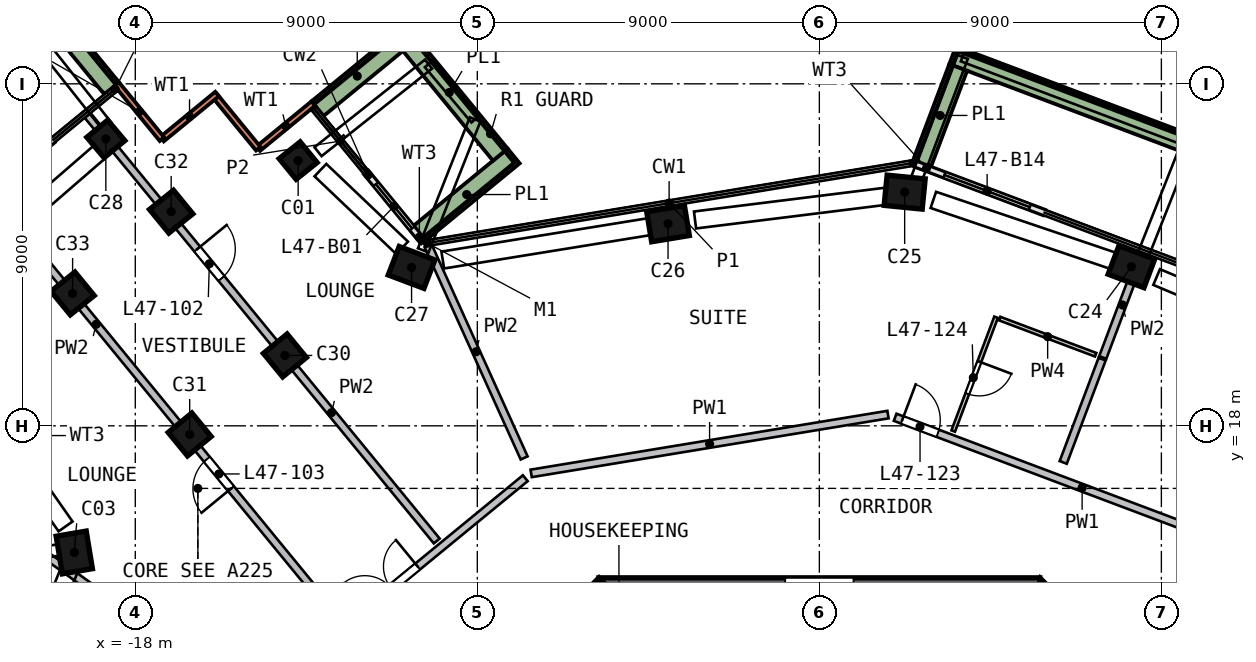
"""IFC4 building model, lengths in metres.
Left out: names, types, materials, properties, quantities, classifications, styles, units other than length and angle.
Written with IfcOpenShell. Run it as: python <this file> out.ifc"""

import sys

from ifc_helpers import new_model, si_unit, direction, frame, frame_2d, origin, origin_2d, place, context, subcontext, project, spatial, rectangle, extrude, element, fill, save


model = new_model("IFC4")
c1 = context("Model", 3, precision=1e-05, world=origin(), true_north=direction((0.0, 1.0)))
c2 = subcontext(c1, "Body", "Model", "MODEL_VIEW")
j1 = project(units=[si_unit("LENGTHUNIT", "METRE"), si_unit("PLANEANGLEUNIT", "RADIAN")], contexts=[c1])
p1 = place(None, origin())
s1 = spatial("IfcSite", under=j1, at=p1, CompositionType="ELEMENT")
p2 = place(p1, origin())
s2 = spatial("IfcBuilding", under=s1, at=p2, CompositionType="ELEMENT")
p3 = place(p2, frame((0.0, 0.0, 194.0)))
s3 = spatial("IfcBuildingStorey", under=s2, at=p3, CompositionType="ELEMENT", Elevation=194.0)
p4 = place(p3, frame((-13.515, 24.992, 0.0), z_axis=(-0.163974568, -0.009965305, 0.98641423), x_axis=(-0.62120179, 0.777821307, -0.095406236)))
e1 = element("IfcColumn", 1, at=p4, inside=s3, PredefinedType="COLUMN", context=c2, shape_type="SweptSolid", body=[
    extrude(rectangle(XDim=0.7, YDim=0.7, at=origin_2d()), origin(), (0.0, 0.0, 1.0), 3.234),
])
p5 = place(p3, frame((-19.521, 14.78, 0.0), z_axis=(-0.069476843, -0.093421269, 0.993199595), x_axis=(-0.169022074, 0.982313293, 0.080573769)))
e2 = element("IfcColumn", 2, at=p5, inside=s3, PredefinedType="COLUMN", context=c2, shape_type="SweptSolid", body=[
    extrude(rectangle(XDim=1.0, YDim=0.8, at=origin_2d()), origin(), (0.0, 0.0, 1.0), 3.212),
])
p6 = place(p3, frame((8.339, 22.14, 0.0), z_axis=(-0.105631262, 0.038784697, 0.993648722), x_axis=(-0.929821941, 0.350385276, -0.112522514)))
e3 = element("IfcColumn", 3, at=p6, inside=s3, PredefinedType="COLUMN", context=c2, shape_type="SweptSolid", body=[
    extrude(rectangle(XDim=1.0, YDim=0.8, at=origin_2d()), origin(), (0.0, 0.0, 1.0), 3.21),
])
p7 = place(p3, frame((2.384, 24.137, 0.0), z_axis=(-0.114871908, 0.010339232, 0.993326505), x_axis=(0.988536042, -0.097442208, 0.115332167)))
e4 = element("IfcColumn", 4, at=p7, inside=s3, PredefinedType="COLUMN", context=c2, shape_type="SweptSolid", body=[
    extrude(rectangle(XDim=1.0, YDim=0.8, at=origin_2d()), origin(), (0.0, 0.0, 1.0), 3.211),
])
p8 = place(p3, frame((-3.848, 23.343, 0.0), z_axis=(-0.110878491, -0.019240232, 0.993647711), x_axis=(-0.980424155, -0.161570885, -0.112531444)))
e5 = element("IfcColumn", 5, at=p8, inside=s3, PredefinedType="COLUMN", context=c2, shape_type="SweptSolid", body=[
    extrude(rectangle(XDim=1.0, YDim=0.8, at=origin_2d()), origin(), (0.0, 0.0, 1.0), 3.21),
])
p9 = place(p3, frame((-10.603, 22.23, 0.0), z_axis=(-0.105270942, -0.051305333, 0.993119223), x_axis=(0.930381174, -0.35772673, 0.080140241)))
e6 = element("IfcColumn", 6, at=p9, inside=s3, PredefinedType="COLUMN", context=c2, shape_type="SweptSolid", body=[
    extrude(rectangle(XDim=1.0, YDim=0.8, at=origin_2d()), origin(), (0.0, 0.0, 1.0), 3.212),
])
p10 = place(p3, frame((-18.572, 25.591, 0.0), z_axis=(-0.166383559, -0.033865013, 0.985479412), x_axis=(-0.756669368, -0.636446663, -0.149623234)))
e7 = element("IfcColumn", 7, at=p10, inside=s3, PredefinedType="COLUMN", context=c2, shape_type="SweptSolid", body=[
    extrude(rectangle(XDim=0.7, YDim=0.7, at=origin_2d()), origin(), (0.0, 0.0, 1.0), 3.237),
])
for number, where, z_axis, x_axis in (
    (8, (-13.949, 19.933, 0.0), (-0.094, -0.067, 0.993), (-0.634, 0.774, -0.008)),
    (9, (-16.467, 17.868, 0.0), (-0.084, -0.079, 0.993), (-0.635, 0.773, 0.008)),
):
    element("IfcColumn", number, at=place(p3, frame(where, z_axis=z_axis, x_axis=x_axis)), inside=s3, PredefinedType="COLUMN", context=c2, shape_type="SweptSolid", body=[
        extrude(rectangle(XDim=0.8, YDim=0.8, at=origin_2d()), origin(), (0.0, 0.0, 1.0), 3.211),
    ])
p11 = place(p3, frame((-16.864, 23.667, 0.0), z_axis=(-0.157749477, -0.025762726, 0.987143041), x_axis=(-0.623531863, 0.777761167, -0.079344709)))
e10 = element("IfcColumn", 10, at=p11, inside=s3, PredefinedType="COLUMN", context=c2, shape_type="SweptSolid", body=[
    extrude(rectangle(XDim=0.8, YDim=0.8, at=origin_2d()), origin(), (0.0, 0.0, 1.0), 3.231),
])
p12 = place(p3, frame((-19.47, 21.53, 0.0), z_axis=(-0.147722608, -0.038046325, 0.988296771), x_axis=(-0.625986213, 0.777232529, -0.063646343)))
e11 = element("IfcColumn", 11, at=p12, inside=s3, PredefinedType="COLUMN", context=c2, shape_type="SweptSolid", body=[
    extrude(rectangle(XDim=0.8, YDim=0.8, at=origin_2d()), origin(), (0.0, 0.0, 1.0), 3.228),
])
p13 = place(p3, frame((13.788, 5.587, 0.0), z_axis=(0.0, 0.0, 1.0), x_axis=(-0.707106781, 0.707106781, 0.0)))
e12 = element("IfcWall", 12, at=p13, inside=s3, PredefinedType="SHEAR", context=c2, shape_type="SweptSolid", body=[
    extrude(rectangle(XDim=11.598, YDim=0.6, at=frame_2d((5.799, 0.0))), origin(), (0.0, 0.0, 1.0), 3.5),
])
p14 = place(p13, frame((2.099, 0.0, 0.0)))
e13 = element("IfcOpeningElement", 13, at=p14, cuts=e12, PredefinedType="OPENING", context=c2, shape_type="SweptSolid", body=[
    extrude(rectangle(XDim=1.2, YDim=2.1, at=frame_2d((0.6, 1.05))), frame((0.0, 0.31, 0.0), z_axis=(0.0, -1.0, 0.0), x_axis=(1.0, 0.0, 0.0)), (0.0, 0.0, 1.0), 0.62),
])
p15 = place(p3, frame((5.799, 13.7, 0.0), z_axis=(0.0, 0.0, 1.0), x_axis=(-1.0, 0.0, 0.0)))
e14 = element("IfcWall", 14, at=p15, inside=s3, PredefinedType="SHEAR", context=c2, shape_type="SweptSolid", body=[
    extrude(rectangle(XDim=11.598, YDim=0.6, at=frame_2d((5.799, 0.0))), origin(), (0.0, 0.0, 1.0), 3.5),
])
p16 = place(p15, frame((4.899, 0.0, 0.0)))
e15 = element("IfcOpeningElement", 15, at=p16, cuts=e14, PredefinedType="OPENING", context=c2, shape_type="SweptSolid", body=[
    extrude(rectangle(XDim=1.8, YDim=2.1, at=frame_2d((0.9, 1.05))), frame((0.0, 0.31, 0.0), z_axis=(0.0, -1.0, 0.0), x_axis=(1.0, 0.0, 0.0)), (0.0, 0.0, 1.0), 0.62),
])
p17 = place(p3, frame((-5.587, 13.788, 0.0), z_axis=(0.0, 0.0, 1.0), x_axis=(-0.707106781, -0.707106781, 0.0)))
e16 = element("IfcWall", 16, at=p17, inside=s3, PredefinedType="SHEAR", context=c2, shape_type="SweptSolid", body=[
    extrude(rectangle(XDim=11.598, YDim=0.6, at=frame_2d((5.799, 0.0))), origin(), (0.0, 0.0, 1.0), 3.5),
])
p18 = place(p3, frame((-13.315, 26.482, 0.0), z_axis=(0.0, 0.0, 1.0), x_axis=(-0.77315031, -0.63422283, 0.0)))
e17 = element("IfcWall", 17, at=p18, inside=s3, PredefinedType="SOLIDWALL", context=c2, shape_type="SweptSolid", body=[
    extrude(rectangle(XDim=1.875, YDim=0.15, at=frame_2d((0.938, 0.0))), origin(), (0.0, 0.0, 1.0), 3.19),
])
p19 = place(p3, frame((-14.764, 25.293, 0.0), z_axis=(0.0, 0.0, 1.0), x_axis=(-0.634175276, 0.773189317, 0.0)))
e18 = element("IfcWall", 18, at=p19, inside=s3, PredefinedType="SOLIDWALL", context=c2, shape_type="SweptSolid", body=[
    extrude(rectangle(XDim=1.8, YDim=0.15, at=frame_2d((0.9, 0.0))), origin(), (0.0, 0.0, 1.0), 3.19),
])
for number, where, z_axis, x_axis in (
    (19, (-15.848, 26.732, 0.0), (0.0, 0.0, 1.0), (-0.773, -0.634, 0.0)),
    (20, (-17.298, 25.543, 0.0), (0.0, 0.0, 1.0), (-0.634, 0.773, 0.0)),
):
    element("IfcWall", number, at=place(p3, frame(where, z_axis=z_axis, x_axis=x_axis)), inside=s3, PredefinedType="SOLIDWALL", context=c2, shape_type="SweptSolid", body=[
        extrude(rectangle(XDim=1.875, YDim=0.15, at=frame_2d((0.938, 0.0))), origin(), (0.0, 0.0, 1.0), 3.19),
    ])
p20 = place(p3, frame((-10.461, 22.885, 0.0), z_axis=(0.0, 0.0, 1.0), x_axis=(-0.634212662, 0.773158651, 0.0)))
e21 = element("IfcWall", 21, at=p20, inside=s3, PredefinedType="SOLIDWALL", context=c2, shape_type="SweptSolid", body=[
    extrude(rectangle(XDim=2.303, YDim=0.15, at=frame_2d((1.152, 0.0))), origin(), (0.0, 0.0, 1.0), 2.475),
])
p21 = place(p20, frame((0.404, 0.0, 0.0)))
e22 = element("IfcOpeningElement", 22, at=p21, cuts=e21, PredefinedType="OPENING", context=c2, shape_type="SweptSolid", body=[
    extrude(rectangle(XDim=1.5, YDim=2.4, at=frame_2d((0.75, 1.2))), frame((0.0, 0.085, 0.0), z_axis=(0.0, -1.0, 0.0), x_axis=(1.0, 0.0, 0.0)), (0.0, 0.0, 1.0), 0.17),
])
p22 = place(p3, frame((-20.167, 25.517, 0.0), z_axis=(0.0, 0.0, 1.0), x_axis=(-0.77314587, -0.634228242, 0.0)))
e23 = element("IfcWall", 23, at=p22, inside=s3, PredefinedType="SOLIDWALL", context=c2, shape_type="SweptSolid", body=[
    extrude(rectangle(XDim=3.26, YDim=0.15, at=frame_2d((1.63, 0.0))), origin(), (0.0, 0.0, 1.0), 2.475),
])
p23 = place(p22, frame((0.4, 0.0, 0.0)))
e24 = element("IfcOpeningElement", 24, at=p23, cuts=e23, PredefinedType="OPENING", context=c2, shape_type="SweptSolid", body=[
    extrude(rectangle(XDim=1.5, YDim=2.4, at=frame_2d((0.75, 1.2))), frame((0.0, 0.085, 0.0), z_axis=(0.0, -1.0, 0.0), x_axis=(1.0, 0.0, 0.0)), (0.0, 0.0, 1.0), 0.17),
])
p24 = place(p3, frame((5.913, 23.615, 0.0), z_axis=(0.0, 0.0, 1.0), x_axis=(-0.935824999, 0.352464993, 0.0)))
e25 = element("IfcWall", 25, at=p24, inside=s3, PredefinedType="SOLIDWALL", context=c2, shape_type="SweptSolid", body=[
    extrude(rectangle(XDim=3.609, YDim=0.15, at=frame_2d((1.804, 0.0))), origin(), (0.0, 0.0, 1.0), 2.475),
])
p25 = place(p24, frame((0.4, 0.0, 0.0)))
e26 = element("IfcOpeningElement", 26, at=p25, cuts=e25, PredefinedType="OPENING", context=c2, shape_type="SweptSolid", body=[
    extrude(rectangle(XDim=2.4, YDim=2.4, at=frame_2d((1.2, 1.2))), frame((0.0, 0.085, 0.0), z_axis=(0.0, -1.0, 0.0), x_axis=(1.0, 0.0, 0.0)), (0.0, 0.0, 1.0), 0.17),
])
p26 = place(p3, frame((-18.623, 26.882, 0.0), z_axis=(0.0, 0.0, 1.0), x_axis=(-0.634197315, 0.773171239, 0.0)))
e27 = element("IfcWall", 27, at=p26, inside=s3, PredefinedType="SOLIDWALL", context=c2, shape_type="SweptSolid", body=[
    extrude(rectangle(XDim=3.199, YDim=0.5, at=frame_2d((1.6, 0.0))), origin(), (0.0, 0.0, 1.0), 0.7),
])
p27 = place(p3, frame((16.351, 22.916, 0.0), z_axis=(0.0, 0.0, 1.0), x_axis=(-0.93581421, 0.352493637, 0.0)))
e28 = element("IfcWall", 28, at=p27, inside=s3, PredefinedType="SOLIDWALL", context=c2, shape_type="SweptSolid", body=[
    extrude(rectangle(XDim=13.723, YDim=0.5, at=frame_2d((6.862, 0.0))), origin(), (0.0, 0.0, 1.0), 0.7),
])
p28 = place(p3, frame((3.654, 27.431, 0.0), z_axis=(0.0, 0.0, 1.0), x_axis=(-0.352490997, -0.935815205, 0.0)))
e29 = element("IfcWall", 29, at=p28, inside=s3, PredefinedType="SOLIDWALL", context=c2, shape_type="SweptSolid", body=[
    extrude(rectangle(XDim=2.699, YDim=0.5, at=frame_2d((1.35, 0.0))), origin(), (0.0, 0.0, 1.0), 0.7),
])
p29 = place(p3, frame((-10.517, 23.072, 0.0), z_axis=(0.0, 0.0, 1.0), x_axis=(0.773171239, 0.634197315, 0.0)))
e30 = element("IfcWall", 30, at=p29, inside=s3, PredefinedType="SOLIDWALL", context=c2, shape_type="SweptSolid", body=[
    extrude(rectangle(XDim=3.199, YDim=0.5, at=frame_2d((1.6, 0.0))), origin(), (0.0, 0.0, 1.0), 0.7),
])
p30 = place(p3, frame((-8.395, 25.136, 0.0), z_axis=(0.0, 0.0, 1.0), x_axis=(-0.634200896, 0.773168302, 0.0)))
e31 = element("IfcWall", 31, at=p30, inside=s3, PredefinedType="SOLIDWALL", context=c2, shape_type="SweptSolid", body=[
    extrude(rectangle(XDim=4.236, YDim=0.5, at=frame_2d((2.118, 0.0))), origin(), (0.0, 0.0, 1.0), 0.7),
])
p31 = place(p3, frame((-11.116, 28.059, 0.0), z_axis=(0.0, 0.0, 1.0), x_axis=(-0.773195051, -0.634168285, 0.0)))
e32 = element("IfcWall", 32, at=p31, inside=s3, PredefinedType="SOLIDWALL", context=c2, shape_type="SweptSolid", body=[
    extrude(rectangle(XDim=2.699, YDim=0.5, at=frame_2d((1.35, 0.0))), origin(), (0.0, 0.0, 1.0), 0.7),
])
p32 = place(p3, frame((-14.941, 10.713, 0.0), z_axis=(0.0, 0.0, 1.0), x_axis=(0.773179127, 0.634187699, 0.0)))
e33 = element("IfcWall", 33, at=p32, inside=s3, PredefinedType="SOLIDWALL", context=c2, shape_type="SweptSolid", body=[
    extrude(rectangle(XDim=9.317, YDim=0.2, at=frame_2d((4.658, 0.0))), origin(), (0.0, 0.0, 1.0), 3.19),
])
p33 = place(p32, frame((3.854, 0.0, 0.0)))
e34 = element("IfcOpeningElement", 34, at=p33, cuts=e33, PredefinedType="OPENING", context=c2, shape_type="SweptSolid", body=[
    extrude(rectangle(XDim=1.8, YDim=2.1, at=frame_2d((0.9, 1.05))), frame((0.0, 0.11, 0.0), z_axis=(0.0, -1.0, 0.0), x_axis=(1.0, 0.0, 0.0)), (0.0, 0.0, 1.0), 0.22),
])
p34 = place(p3, frame((1.806, 18.296, 0.0), z_axis=(0.0, 0.0, 1.0), x_axis=(-0.986687031, -0.16263057, 0.0)))
e35 = element("IfcWall", 35, at=p34, inside=s3, PredefinedType="SOLIDWALL", context=c2, shape_type="SweptSolid", body=[
    extrude(rectangle(XDim=9.516, YDim=0.2, at=frame_2d((4.758, 0.0))), origin(), (0.0, 0.0, 1.0), 3.19),
])
p35 = place(p3, frame((1.994, 18.225, 0.0), z_axis=(0.0, 0.0, 1.0), x_axis=(0.935816375, -0.352487889, 0.0)))
e36 = element("IfcWall", 36, at=p35, inside=s3, PredefinedType="SOLIDWALL", context=c2, shape_type="SweptSolid", body=[
    extrude(rectangle(XDim=9.115, YDim=0.2, at=frame_2d((4.558, 0.0))), origin(), (0.0, 0.0, 1.0), 3.19),
])
p36 = place(p35, frame((0.2, 0.0, 0.0)))
e37 = element("IfcOpeningElement", 37, at=p36, cuts=e36, PredefinedType="OPENING", context=c2, shape_type="SweptSolid", body=[
    extrude(rectangle(XDim=1.0, YDim=2.1, at=frame_2d((0.5, 1.05))), frame((0.0, 0.11, 0.0), z_axis=(0.0, -1.0, 0.0), x_axis=(1.0, 0.0, 0.0)), (0.0, 0.0, 1.0), 0.22),
])
p37 = place(p3, frame((-17.841, 12.792, 0.0), z_axis=(0.0, 0.0, 1.0), x_axis=(-0.812658436, 0.582740307, 0.0)))
e38 = element("IfcWall", 38, at=p37, inside=s3, PredefinedType="SOLIDWALL", context=c2, shape_type="SweptSolid", body=[
    extrude(rectangle(XDim=3.011, YDim=0.2, at=frame_2d((1.506, 0.0))), origin(), (0.0, 0.0, 1.0), 2.69),
])
p38 = place(p3, frame((-12.629, 12.868, 0.0), z_axis=(0.0, 0.0, 1.0), x_axis=(-0.634195474, 0.773172749, 0.0)))
e39 = element("IfcWall", 39, at=p38, inside=s3, PredefinedType="SOLIDWALL", context=c2, shape_type="SweptSolid", body=[
    extrude(rectangle(XDim=14.486, YDim=0.2, at=frame_2d((7.243, 0.0))), origin(), (0.0, 0.0, 1.0), 3.19),
])
p39 = place(p38, frame((4.5, 0.0, 0.0)))
e40 = element("IfcOpeningElement", 40, at=p39, cuts=e39, PredefinedType="OPENING", context=c2, shape_type="SweptSolid", body=[
    extrude(rectangle(XDim=1.0, YDim=2.1, at=frame_2d((0.5, 1.05))), frame((0.0, 0.11, 0.0), z_axis=(0.0, -1.0, 0.0), x_axis=(1.0, 0.0, 0.0)), (0.0, 0.0, 1.0), 0.22),
])
p40 = place(p3, frame((-19.254, 26.169, 0.0), z_axis=(0.0, 0.0, 1.0), x_axis=(0.63418721, -0.773179528, 0.0)))
e41 = element("IfcWall", 41, at=p40, inside=s3, PredefinedType="SOLIDWALL", context=c2, shape_type="SweptSolid", body=[
    extrude(rectangle(XDim=14.486, YDim=0.2, at=frame_2d((7.243, 0.0))), origin(), (0.0, 0.0, 1.0), 3.19),
])
p41 = place(p40, frame((4.55, 0.0, 0.0)))
e42 = element("IfcOpeningElement", 42, at=p41, cuts=e41, PredefinedType="OPENING", context=c2, shape_type="SweptSolid", body=[
    extrude(rectangle(XDim=1.0, YDim=2.1, at=frame_2d((0.5, 1.05))), frame((0.0, 0.11, 0.0), z_axis=(0.0, -1.0, 0.0), x_axis=(1.0, 0.0, 0.0)), (0.0, 0.0, 1.0), 0.22),
])
p42 = place(p3, frame((-10.297, 22.742, 0.0), z_axis=(0.0, 0.0, 1.0), x_axis=(0.412467657, -0.910972245, 0.0)))
e43 = element("IfcWall", 43, at=p42, inside=s3, PredefinedType="SOLIDWALL", context=c2, shape_type="SweptSolid", body=[
    extrude(rectangle(XDim=6.132, YDim=0.2, at=frame_2d((3.066, 0.0))), origin(), (0.0, 0.0, 1.0), 3.19),
])
p43 = place(p3, frame((6.417, 17.037, 0.0), z_axis=(0.0, 0.0, 1.0), x_axis=(0.352504699, 0.935810043, 0.0)))
e44 = element("IfcWall", 44, at=p43, inside=s3, PredefinedType="SOLIDWALL", context=c2, shape_type="SweptSolid", body=[
    extrude(rectangle(XDim=2.905, YDim=0.2, at=frame_2d((1.452, 0.0))), origin(), (0.0, 0.0, 1.0), 3.19),
])
p44 = place(p3, frame((7.458, 19.798, 0.0), z_axis=(0.0, 0.0, 1.0), x_axis=(0.352491676, 0.935814949, 0.0)))
e45 = element("IfcWall", 45, at=p44, inside=s3, PredefinedType="SOLIDWALL", context=c2, shape_type="SweptSolid", body=[
    extrude(rectangle(XDim=2.952, YDim=0.2, at=frame_2d((1.476, 0.0))), origin(), (0.0, 0.0, 1.0), 3.19),
])
p45 = place(p3, frame((4.651, 20.858, 0.0), z_axis=(0.0, 0.0, 1.0), x_axis=(-0.352544364, -0.935795101, 0.0)))
e46 = element("IfcWall", 46, at=p45, inside=s3, PredefinedType="PARTITIONING", context=c2, shape_type="SweptSolid", body=[
    extrude(rectangle(XDim=3.2, YDim=0.1, at=frame_2d((1.6, 0.0))), origin(), (0.0, 0.0, 1.0), 3.19),
])
p46 = place(p45, frame((1.25, 0.0, 0.0)))
e47 = element("IfcOpeningElement", 47, at=p46, cuts=e46, PredefinedType="OPENING", context=c2, shape_type="SweptSolid", body=[
    extrude(rectangle(XDim=0.9, YDim=2.1, at=frame_2d((0.45, 1.05))), frame((0.0, 0.06, 0.0), z_axis=(0.0, -1.0, 0.0), x_axis=(1.0, 0.0, 0.0)), (0.0, 0.0, 1.0), 0.12),
])
p47 = place(p3, frame((4.744, 20.823, 0.0), z_axis=(0.0, 0.0, 1.0), x_axis=(0.935819082, -0.352480702, 0.0)))
e48 = element("IfcWall", 48, at=p47, inside=s3, PredefinedType="PARTITIONING", context=c2, shape_type="SweptSolid", body=[
    extrude(rectangle(XDim=2.7, YDim=0.1, at=frame_2d((1.35, 0.0))), origin(), (0.0, 0.0, 1.0), 3.19),
])
p48 = place(p21, origin())
e49 = element("IfcDoor", 49, at=p48, inside=s3, OperationType="SLIDING_TO_LEFT", PredefinedType="DOOR", context=c2, shape_type="SweptSolid", body=[
    extrude(rectangle(XDim=1.5, YDim=2.4, at=frame_2d((0.75, 1.2))), frame((0.0, 0.025, 0.0), z_axis=(0.0, -1.0, 0.0), x_axis=(1.0, 0.0, 0.0)), (0.0, 0.0, 1.0), 0.05),
])
fill(e22, e49)
p49 = place(p25, origin())
e50 = element("IfcDoor", 50, at=p49, inside=s3, OperationType="SLIDING_TO_RIGHT", PredefinedType="DOOR", context=c2, shape_type="SweptSolid", body=[
    extrude(rectangle(XDim=2.4, YDim=2.4, at=frame_2d((1.2, 1.2))), frame((0.0, 0.025, 0.0), z_axis=(0.0, -1.0, 0.0), x_axis=(1.0, 0.0, 0.0)), (0.0, 0.0, 1.0), 0.05),
])
fill(e26, e50)
p50 = place(p33, origin())
e51 = element("IfcDoor", 51, at=p50, inside=s3, OperationType="DOUBLE_DOOR_SINGLE_SWING", PredefinedType="DOOR", context=c2, shape_type="SweptSolid", body=[
    extrude(rectangle(XDim=1.8, YDim=2.1, at=frame_2d((0.9, 1.05))), frame((0.0, 0.025, 0.0), z_axis=(0.0, -1.0, 0.0), x_axis=(1.0, 0.0, 0.0)), (0.0, 0.0, 1.0), 0.05),
])
fill(e34, e51)
p51 = place(p41, origin())
e52 = element("IfcDoor", 52, at=p51, inside=s3, OperationType="SINGLE_SWING_LEFT", PredefinedType="DOOR", context=c2, shape_type="SweptSolid", body=[
    extrude(rectangle(XDim=1.0, YDim=2.1, at=frame_2d((0.5, 1.05))), frame((0.0, 0.025, 0.0), z_axis=(0.0, -1.0, 0.0), x_axis=(1.0, 0.0, 0.0)), (0.0, 0.0, 1.0), 0.05),
])
fill(e42, e52)
p52 = place(p39, origin())
e53 = element("IfcDoor", 53, at=p52, inside=s3, OperationType="SINGLE_SWING_LEFT", PredefinedType="DOOR", context=c2, shape_type="SweptSolid", body=[
    extrude(rectangle(XDim=1.0, YDim=2.1, at=frame_2d((0.5, 1.05))), frame((0.0, 0.025, 0.0), z_axis=(0.0, -1.0, 0.0), x_axis=(1.0, 0.0, 0.0)), (0.0, 0.0, 1.0), 0.05),
])
fill(e40, e53)
p53 = place(p36, origin())
e54 = element("IfcDoor", 54, at=p53, inside=s3, OperationType="SINGLE_SWING_LEFT", PredefinedType="DOOR", context=c2, shape_type="SweptSolid", body=[
    extrude(rectangle(XDim=1.0, YDim=2.1, at=frame_2d((0.5, 1.05))), frame((0.0, 0.025, 0.0), z_axis=(0.0, -1.0, 0.0), x_axis=(1.0, 0.0, 0.0)), (0.0, 0.0, 1.0), 0.05),
])
fill(e37, e54)
p54 = place(p46, origin())
e55 = element("IfcDoor", 55, at=p54, inside=s3, OperationType="SINGLE_SWING_LEFT", PredefinedType="DOOR", context=c2, shape_type="SweptSolid", body=[
    extrude(rectangle(XDim=0.9, YDim=2.1, at=frame_2d((0.45, 1.05))), frame((0.0, 0.025, 0.0), z_axis=(0.0, -1.0, 0.0), x_axis=(1.0, 0.0, 0.0)), (0.0, 0.0, 1.0), 0.05),
])
fill(e47, e55)
save(model, sys.argv[1])
